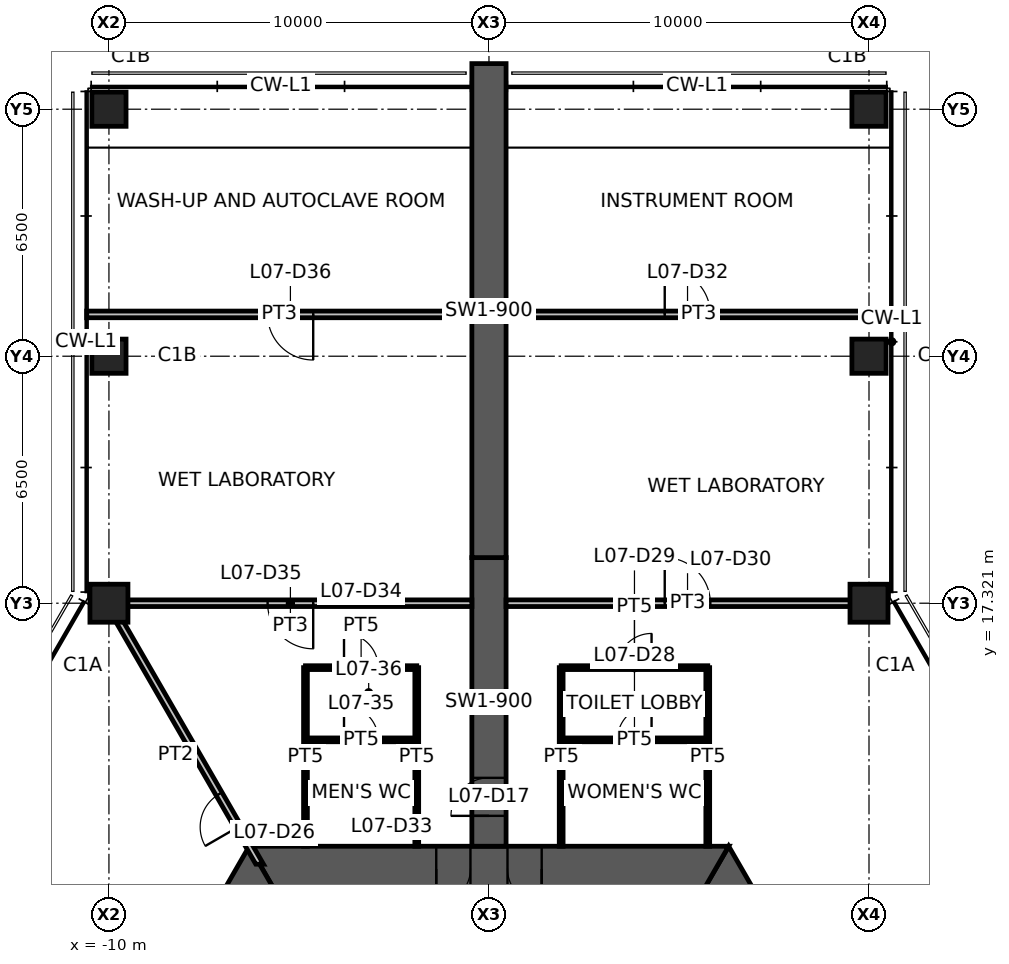
"""IFC4 building model, lengths in metres.
Left out: names, types, materials, properties, quantities, classifications, styles, units other than length and angle.
Written with IfcOpenShell. Run it as: python <this file> out.ifc"""

import sys

from ifc_helpers import new_model, si_unit, direction, frame, frame_2d, origin, origin_2d, place, context, subcontext, project, spatial, polyline, rectangle, hollow_rectangle, outline, extrude, element, fill, save


model = new_model("IFC4")
c1 = context("Model", 3, precision=1e-05, world=origin(), true_north=direction((0.0, 1.0)))
c2 = subcontext(c1, "Body", "Model", "MODEL_VIEW")
j1 = project(units=[si_unit("LENGTHUNIT", "METRE"), si_unit("PLANEANGLEUNIT", "RADIAN")], contexts=[c1])
p1 = place(None, origin())
s1 = spatial("IfcSite", under=j1, at=p1, CompositionType="ELEMENT")
p2 = place(p1, origin())
s2 = spatial("IfcBuilding", under=s1, at=p2, CompositionType="ELEMENT")
p3 = place(p2, frame((0.0, 0.0, 26.8)))
s3 = spatial("IfcBuildingStorey", under=s2, at=p3, CompositionType="ELEMENT", Elevation=26.8)
for number, where, z_axis, x_axis in (
    (1, (10.0, 17.321, 0.0), (0.0, 0.0, 1.0), (1.0, 0.0, 0.0)),
    (2, (-10.0, 17.321, 0.0), (0.0, 0.0, 1.0), (1.0, 0.0, 0.0)),
):
    element("IfcColumn", number, at=place(p3, frame(where, z_axis=z_axis, x_axis=x_axis)), inside=s3, PredefinedType="COLUMN", context=c2, shape_type="SweptSolid", body=[
        extrude(hollow_rectangle(XDim=1.0, YDim=1.0, WallThickness=0.06, at=origin_2d()), origin(), (0.0, 0.0, 1.0), 4.2),
    ])
for number, where, z_axis, x_axis in (
    (3, (10.0, 23.821, 0.0), (0.0, 0.0, 1.0), (1.0, 0.0, 0.0)),
    (4, (10.0, 30.321, 0.0), (0.0, 0.0, 1.0), (1.0, 0.0, 0.0)),
    (5, (-10.0, 23.821, 0.0), (0.0, 0.0, 1.0), (1.0, 0.0, 0.0)),
    (6, (-10.0, 30.321, 0.0), (0.0, 0.0, 1.0), (1.0, 0.0, 0.0)),
):
    element("IfcColumn", number, at=place(p3, frame(where, z_axis=z_axis, x_axis=x_axis)), inside=s3, PredefinedType="COLUMN", context=c2, shape_type="SweptSolid", body=[
        extrude(hollow_rectangle(XDim=0.9, YDim=0.9, WallThickness=0.05, at=origin_2d()), origin(), (0.0, 0.0, 1.0), 4.2),
    ])
p4 = place(p3, frame((11.922, 0.0, 0.0), z_axis=(0.0, 0.0, 1.0), x_axis=(-0.500004296715, 0.866022923061, 0.0)))
e7 = element("IfcWall", 7, at=p4, inside=s3, PredefinedType="SHEAR", context=c2, shape_type="SweptSolid", body=[
    extrude(outline(polyline([(-0.346, -0.6), (5.835, -0.6), (6.635, -0.6), (12.269, -0.6), (11.576, 0.6), (6.635, 0.6), (5.835, 0.6), (0.346, 0.6), (-0.346, -0.6)])), origin(), (0.0, 0.0, 1.0), 4.2),
])
p5 = place(p4, frame((5.835, 0.0, 0.0)))
e8 = element("IfcOpeningElement", 8, at=p5, cuts=e7, PredefinedType="OPENING", context=c2, shape_type="SweptSolid", body=[
    extrude(rectangle(XDim=0.8, YDim=2.1, at=frame_2d((0.4, 1.05))), frame((0.0, 0.61, 0.0), z_axis=(0.0, -1.0, 0.0), x_axis=(1.0, 0.0, 0.0)), (0.0, 0.0, 1.0), 1.22),
])
p6 = place(p3, frame((5.961, 10.325, 0.0), z_axis=(0.0, 0.0, 1.0), x_axis=(-1.0, 0.0, 0.0)))
e9 = element("IfcWall", 9, at=p6, inside=s3, PredefinedType="SHEAR", context=c2, shape_type="SweptSolid", body=[
    extrude(outline(polyline([(-0.346, -0.6), (4.574, -0.6), (5.474, -0.6), (6.449, -0.6), (7.349, -0.6), (12.269, -0.6), (11.576, 0.6), (7.349, 0.6), (6.449, 0.6), (5.474, 0.6), (4.574, 0.6), (0.346, 0.6), (-0.346, -0.6)])), origin(), (0.0, 0.0, 1.0), 4.2),
])
p7 = place(p6, frame((6.449, 0.0, 0.0)))
e10 = element("IfcOpeningElement", 10, at=p7, cuts=e9, PredefinedType="OPENING", context=c2, shape_type="SweptSolid", body=[
    extrude(rectangle(XDim=0.9, YDim=2.1, at=frame_2d((0.45, 1.05))), frame((0.0, 0.61, 0.0), z_axis=(0.0, -1.0, 0.0), x_axis=(1.0, 0.0, 0.0)), (0.0, 0.0, 1.0), 1.22),
])
p8 = place(p6, frame((4.574, 0.0, 0.0)))
e11 = element("IfcOpeningElement", 11, at=p8, cuts=e9, PredefinedType="OPENING", context=c2, shape_type="SweptSolid", body=[
    extrude(rectangle(XDim=0.9, YDim=2.1, at=frame_2d((0.45, 1.05))), frame((0.0, 0.61, 0.0), z_axis=(0.0, -1.0, 0.0), x_axis=(1.0, 0.0, 0.0)), (0.0, 0.0, 1.0), 1.22),
])
p9 = place(p3, frame((-5.961, 10.325, 0.0), z_axis=(0.0, 0.0, 1.0), x_axis=(-0.500004296715, -0.866022923061, 0.0)))
e12 = element("IfcWall", 12, at=p9, inside=s3, PredefinedType="SHEAR", context=c2, shape_type="SweptSolid", body=[
    extrude(outline(polyline([(-0.346, -0.6), (4.494, -0.6), (5.494, -0.6), (12.269, -0.6), (11.576, 0.6), (5.494, 0.6), (4.494, 0.6), (0.346, 0.6), (-0.346, -0.6)])), origin(), (0.0, 0.0, 1.0), 4.2),
])
p10 = place(p9, frame((4.494, 0.0, 0.0)))
e13 = element("IfcOpeningElement", 13, at=p10, cuts=e12, PredefinedType="OPENING", context=c2, shape_type="SweptSolid", body=[
    extrude(rectangle(XDim=1.0, YDim=2.1, at=frame_2d((0.5, 1.05))), frame((0.0, 0.61, 0.0), z_axis=(0.0, -1.0, 0.0), x_axis=(1.0, 0.0, 0.0)), (0.0, 0.0, 1.0), 1.22),
])
p11 = place(p3, frame((0.0, 10.925, 0.0), z_axis=(0.0, 0.0, 1.0), x_axis=(0.0, 1.0, 0.0)))
e14 = element("IfcWall", 14, at=p11, inside=s3, PredefinedType="SHEAR", context=c2, shape_type="SweptSolid", body=[
    extrude(rectangle(XDim=7.595, YDim=0.9, at=frame_2d((3.798, 0.0))), origin(), (0.0, 0.0, 1.0), 4.2),
])
p12 = place(p11, frame((0.8, 0.0, 0.0)))
e15 = element("IfcOpeningElement", 15, at=p12, cuts=e14, PredefinedType="OPENING", context=c2, shape_type="SweptSolid", body=[
    extrude(rectangle(XDim=1.0, YDim=2.1, at=frame_2d((0.5, 1.05))), frame((0.0, 0.46, 0.0), z_axis=(0.0, -1.0, 0.0), x_axis=(1.0, 0.0, 0.0)), (0.0, 0.0, 1.0), 0.92),
])
p13 = place(p3, frame((0.0, 18.521, 0.0), z_axis=(0.0, 0.0, 1.0), x_axis=(0.0, 1.0, 0.0)))
e16 = element("IfcWall", 16, at=p13, inside=s3, PredefinedType="SHEAR", context=c2, shape_type="SweptSolid", body=[
    extrude(rectangle(XDim=13.0, YDim=0.9, at=frame_2d((6.5, 0.0))), origin(), (0.0, 0.0, 1.0), 4.2),
])
p14 = place(p3, frame((-6.035, 10.453, 0.0), z_axis=(0.0, 0.0, 1.0), x_axis=(-0.499993402427, 0.866029212861, 0.0)))
e17 = element("IfcWall", 17, at=p14, inside=s3, PredefinedType="PARTITIONING", context=c2, shape_type="SweptSolid", body=[
    extrude(outline(polyline([(-0.051, -0.087), (1.129, -0.087), (2.129, -0.087), (7.93, -0.087), (7.93, 0.087), (2.129, 0.087), (1.129, 0.087), (0.051, 0.087), (-0.051, -0.087)])), origin(), (0.0, 0.0, 1.0), 3.33),
])
p15 = place(p14, frame((1.129, 0.0, 0.0)))
e18 = element("IfcOpeningElement", 18, at=p15, cuts=e17, PredefinedType="OPENING", context=c2, shape_type="SweptSolid", body=[
    extrude(rectangle(XDim=1.0, YDim=2.1, at=frame_2d((0.5, 1.05))), frame((0.0, 0.098, 0.0), z_axis=(0.0, -1.0, 0.0), x_axis=(1.0, 0.0, 0.0)), (0.0, 0.0, 1.0), 0.195),
])
p16 = place(p3, frame((1.9, 13.725, 0.0), z_axis=(0.0, 0.0, 1.0), x_axis=(1.0, 0.0, 0.0)))
e19 = element("IfcWall", 19, at=p16, inside=s3, PredefinedType="PARTITIONING", context=c2, shape_type="SweptSolid", body=[
    extrude(rectangle(XDim=3.857, YDim=0.1, at=frame_2d((1.929, 0.0))), origin(), (0.0, 0.0, 1.0), 3.23),
])
p17 = place(p16, frame((1.479, 0.0, 0.0)))
e20 = element("IfcOpeningElement", 20, at=p17, cuts=e19, PredefinedType="OPENING", context=c2, shape_type="SweptSolid", body=[
    extrude(rectangle(XDim=0.9, YDim=2.1, at=frame_2d((0.45, 1.05))), frame((0.0, 0.06, 0.0), z_axis=(0.0, -1.0, 0.0), x_axis=(1.0, 0.0, 0.0)), (0.0, 0.0, 1.0), 0.12),
])
p18 = place(p3, frame((1.9, 15.625, 0.0), z_axis=(0.0, 0.0, 1.0), x_axis=(1.0, 0.0, 0.0)))
e21 = element("IfcWall", 21, at=p18, inside=s3, PredefinedType="PARTITIONING", context=c2, shape_type="SweptSolid", body=[
    extrude(rectangle(XDim=3.857, YDim=0.1, at=frame_2d((1.929, 0.0))), origin(), (0.0, 0.0, 1.0), 3.23),
])
p19 = place(p18, frame((1.479, 0.0, 0.0)))
e22 = element("IfcOpeningElement", 22, at=p19, cuts=e21, PredefinedType="OPENING", context=c2, shape_type="SweptSolid", body=[
    extrude(rectangle(XDim=0.9, YDim=2.1, at=frame_2d((0.45, 1.05))), frame((0.0, 0.06, 0.0), z_axis=(0.0, -1.0, 0.0), x_axis=(1.0, 0.0, 0.0)), (0.0, 0.0, 1.0), 0.12),
])
for number, where, z_axis, x_axis in (
    (23, (1.9, 10.925, 0.0), (0.0, 0.0, 1.0), (0.0, 1.0, 0.0)),
    (24, (5.757, 10.925, 0.0), (0.0, 0.0, 1.0), (0.0, 1.0, 0.0)),
):
    element("IfcWall", number, at=place(p3, frame(where, z_axis=z_axis, x_axis=x_axis)), inside=s3, PredefinedType="PARTITIONING", context=c2, shape_type="SweptSolid", body=[
        extrude(rectangle(XDim=4.7, YDim=0.1, at=frame_2d((2.35, 0.0))), origin(), (0.0, 0.0, 1.0), 3.23),
    ])
p20 = place(p3, frame((0.45, 17.321, 0.0), z_axis=(0.0, 0.0, 1.0), x_axis=(1.0, 0.0, 0.0)))
e25 = element("IfcWall", 25, at=p20, inside=s3, PredefinedType="PARTITIONING", context=c2, shape_type="SweptSolid", body=[
    extrude(rectangle(XDim=9.55, YDim=0.175, at=frame_2d((4.775, 0.0))), origin(), (0.0, 0.0, 1.0), 3.238),
])
p21 = place(p20, frame((4.175, 0.0, 0.0)))
e26 = element("IfcOpeningElement", 26, at=p21, cuts=e25, PredefinedType="OPENING", context=c2, shape_type="SweptSolid", body=[
    extrude(rectangle(XDim=1.2, YDim=2.1, at=frame_2d((0.6, 1.05))), frame((0.0, 0.098, 0.0), z_axis=(0.0, -1.0, 0.0), x_axis=(1.0, 0.0, 0.0)), (0.0, 0.0, 1.0), 0.195),
])
p22 = place(p3, frame((0.45, 24.92, 0.0), z_axis=(0.0, 0.0, 1.0), x_axis=(1.0, 0.0, 0.0)))
e27 = element("IfcWall", 27, at=p22, inside=s3, PredefinedType="PARTITIONING", context=c2, shape_type="SweptSolid", body=[
    extrude(rectangle(XDim=10.135, YDim=0.175, at=frame_2d((5.067, 0.0))), origin(), (0.0, 0.0, 1.0), 4.03),
])
p23 = place(p22, frame((4.175, 0.0, 0.0)))
e28 = element("IfcOpeningElement", 28, at=p23, cuts=e27, PredefinedType="OPENING", context=c2, shape_type="SweptSolid", body=[
    extrude(rectangle(XDim=1.2, YDim=2.1, at=frame_2d((0.6, 1.05))), frame((0.0, 0.098, 0.0), z_axis=(0.0, -1.0, 0.0), x_axis=(1.0, 0.0, 0.0)), (0.0, 0.0, 1.0), 0.195),
])
p24 = place(p3, frame((-4.829, 13.725, 0.0), z_axis=(0.0, 0.0, 1.0), x_axis=(1.0, 0.0, 0.0)))
e29 = element("IfcWall", 29, at=p24, inside=s3, PredefinedType="PARTITIONING", context=c2, shape_type="SweptSolid", body=[
    extrude(rectangle(XDim=2.929, YDim=0.1, at=frame_2d((1.464, 0.0))), origin(), (0.0, 0.0, 1.0), 3.23),
])
p25 = place(p24, frame((1.014, 0.0, 0.0)))
e30 = element("IfcOpeningElement", 30, at=p25, cuts=e29, PredefinedType="OPENING", context=c2, shape_type="SweptSolid", body=[
    extrude(rectangle(XDim=0.9, YDim=2.1, at=frame_2d((0.45, 1.05))), frame((0.0, 0.06, 0.0), z_axis=(0.0, -1.0, 0.0), x_axis=(1.0, 0.0, 0.0)), (0.0, 0.0, 1.0), 0.12),
])
p26 = place(p3, frame((-4.829, 15.625, 0.0), z_axis=(0.0, 0.0, 1.0), x_axis=(1.0, 0.0, 0.0)))
e31 = element("IfcWall", 31, at=p26, inside=s3, PredefinedType="PARTITIONING", context=c2, shape_type="SweptSolid", body=[
    extrude(rectangle(XDim=2.929, YDim=0.1, at=frame_2d((1.464, 0.0))), origin(), (0.0, 0.0, 1.0), 3.23),
])
p27 = place(p26, frame((1.014, 0.0, 0.0)))
e32 = element("IfcOpeningElement", 32, at=p27, cuts=e31, PredefinedType="OPENING", context=c2, shape_type="SweptSolid", body=[
    extrude(rectangle(XDim=0.9, YDim=2.1, at=frame_2d((0.45, 1.05))), frame((0.0, 0.06, 0.0), z_axis=(0.0, -1.0, 0.0), x_axis=(1.0, 0.0, 0.0)), (0.0, 0.0, 1.0), 0.12),
])
for number, where, z_axis, x_axis in (
    (33, (-1.9, 10.925, 0.0), (0.0, 0.0, 1.0), (0.0, 1.0, 0.0)),
    (34, (-4.829, 10.925, 0.0), (0.0, 0.0, 1.0), (0.0, 1.0, 0.0)),
):
    element("IfcWall", number, at=place(p3, frame(where, z_axis=z_axis, x_axis=x_axis)), inside=s3, PredefinedType="PARTITIONING", context=c2, shape_type="SweptSolid", body=[
        extrude(rectangle(XDim=4.7, YDim=0.1, at=frame_2d((2.35, 0.0))), origin(), (0.0, 0.0, 1.0), 3.23),
    ])
p28 = place(p3, frame((-0.45, 17.321, 0.0), z_axis=(0.0, 0.0, 1.0), x_axis=(-1.0, 0.0, 0.0)))
e35 = element("IfcWall", 35, at=p28, inside=s3, PredefinedType="PARTITIONING", context=c2, shape_type="SweptSolid", body=[
    extrude(rectangle(XDim=9.55, YDim=0.175, at=frame_2d((4.775, 0.0))), origin(), (0.0, 0.0, 1.0), 3.238),
])
p29 = place(p28, frame((4.175, 0.0, 0.0)))
e36 = element("IfcOpeningElement", 36, at=p29, cuts=e35, PredefinedType="OPENING", context=c2, shape_type="SweptSolid", body=[
    extrude(rectangle(XDim=1.2, YDim=2.1, at=frame_2d((0.6, 1.05))), frame((0.0, 0.098, 0.0), z_axis=(0.0, -1.0, 0.0), x_axis=(1.0, 0.0, 0.0)), (0.0, 0.0, 1.0), 0.195),
])
p30 = place(p3, frame((-0.45, 24.92, 0.0), z_axis=(0.0, 0.0, 1.0), x_axis=(-1.0, 0.0, 0.0)))
e37 = element("IfcWall", 37, at=p30, inside=s3, PredefinedType="PARTITIONING", context=c2, shape_type="SweptSolid", body=[
    extrude(rectangle(XDim=10.135, YDim=0.175, at=frame_2d((5.067, 0.0))), origin(), (0.0, 0.0, 1.0), 4.03),
])
p31 = place(p30, frame((4.175, 0.0, 0.0)))
e38 = element("IfcOpeningElement", 38, at=p31, cuts=e37, PredefinedType="OPENING", context=c2, shape_type="SweptSolid", body=[
    extrude(rectangle(XDim=1.2, YDim=2.1, at=frame_2d((0.6, 1.05))), frame((0.0, 0.098, 0.0), z_axis=(0.0, -1.0, 0.0), x_axis=(1.0, 0.0, 0.0)), (0.0, 0.0, 1.0), 0.195),
])
p32 = place(p7, origin())
e39 = element("IfcDoor", 39, at=p32, inside=s3, OperationType="SINGLE_SWING_RIGHT", PredefinedType="DOOR", context=c2, shape_type="SweptSolid", body=[
    extrude(rectangle(XDim=0.9, YDim=2.1, at=frame_2d((0.45, 1.05))), frame((0.0, 0.025, 0.0), z_axis=(0.0, -1.0, 0.0), x_axis=(1.0, 0.0, 0.0)), (0.0, 0.0, 1.0), 0.05),
])
fill(e10, e39)
p33 = place(p8, origin())
e40 = element("IfcDoor", 40, at=p33, inside=s3, OperationType="SINGLE_SWING_LEFT", PredefinedType="DOOR", context=c2, shape_type="SweptSolid", body=[
    extrude(rectangle(XDim=0.9, YDim=2.1, at=frame_2d((0.45, 1.05))), frame((0.0, 0.025, 0.0), z_axis=(0.0, -1.0, 0.0), x_axis=(1.0, 0.0, 0.0)), (0.0, 0.0, 1.0), 0.05),
])
fill(e11, e40)
p34 = place(p12, origin())
e41 = element("IfcDoor", 41, at=p34, inside=s3, OperationType="SINGLE_SWING_LEFT", PredefinedType="DOOR", context=c2, shape_type="SweptSolid", body=[
    extrude(rectangle(XDim=1.0, YDim=2.1, at=frame_2d((0.5, 1.05))), frame((0.0, 0.025, 0.0), z_axis=(0.0, -1.0, 0.0), x_axis=(1.0, 0.0, 0.0)), (0.0, 0.0, 1.0), 0.05),
])
fill(e15, e41)
p35 = place(p15, origin())
e42 = element("IfcDoor", 42, at=p35, inside=s3, OperationType="SINGLE_SWING_LEFT", PredefinedType="DOOR", context=c2, shape_type="SweptSolid", body=[
    extrude(rectangle(XDim=1.0, YDim=2.1, at=frame_2d((0.5, 1.05))), frame((0.0, 0.025, 0.0), z_axis=(0.0, -1.0, 0.0), x_axis=(1.0, 0.0, 0.0)), (0.0, 0.0, 1.0), 0.05),
])
fill(e18, e42)
p36 = place(p17, origin())
e43 = element("IfcDoor", 43, at=p36, inside=s3, OperationType="SINGLE_SWING_RIGHT", PredefinedType="DOOR", context=c2, shape_type="SweptSolid", body=[
    extrude(rectangle(XDim=0.9, YDim=2.1, at=frame_2d((0.45, 1.05))), frame((0.0, 0.025, 0.0), z_axis=(0.0, -1.0, 0.0), x_axis=(1.0, 0.0, 0.0)), (0.0, 0.0, 1.0), 0.05),
])
fill(e20, e43)
p37 = place(p19, origin())
e44 = element("IfcDoor", 44, at=p37, inside=s3, OperationType="SINGLE_SWING_RIGHT", PredefinedType="DOOR", context=c2, shape_type="SweptSolid", body=[
    extrude(rectangle(XDim=0.9, YDim=2.1, at=frame_2d((0.45, 1.05))), frame((0.0, 0.025, 0.0), z_axis=(0.0, -1.0, 0.0), x_axis=(1.0, 0.0, 0.0)), (0.0, 0.0, 1.0), 0.05),
])
fill(e22, e44)
p38 = place(p21, origin())
e45 = element("IfcDoor", 45, at=p38, inside=s3, OperationType="DOUBLE_DOOR_SINGLE_SWING", PredefinedType="DOOR", context=c2, shape_type="SweptSolid", body=[
    extrude(rectangle(XDim=1.2, YDim=2.1, at=frame_2d((0.6, 1.05))), frame((0.0, 0.025, 0.0), z_axis=(0.0, -1.0, 0.0), x_axis=(1.0, 0.0, 0.0)), (0.0, 0.0, 1.0), 0.05),
])
fill(e26, e45)
p39 = place(p23, origin())
e46 = element("IfcDoor", 46, at=p39, inside=s3, OperationType="DOUBLE_DOOR_SINGLE_SWING", PredefinedType="DOOR", context=c2, shape_type="SweptSolid", body=[
    extrude(rectangle(XDim=1.2, YDim=2.1, at=frame_2d((0.6, 1.05))), frame((0.0, 0.025, 0.0), z_axis=(0.0, -1.0, 0.0), x_axis=(1.0, 0.0, 0.0)), (0.0, 0.0, 1.0), 0.05),
])
fill(e28, e46)
p40 = place(p25, origin())
e47 = element("IfcDoor", 47, at=p40, inside=s3, OperationType="SINGLE_SWING_LEFT", PredefinedType="DOOR", context=c2, shape_type="SweptSolid", body=[
    extrude(rectangle(XDim=0.9, YDim=2.1, at=frame_2d((0.45, 1.05))), frame((0.0, 0.025, 0.0), z_axis=(0.0, -1.0, 0.0), x_axis=(1.0, 0.0, 0.0)), (0.0, 0.0, 1.0), 0.05),
])
fill(e30, e47)
p41 = place(p27, origin())
e48 = element("IfcDoor", 48, at=p41, inside=s3, OperationType="SINGLE_SWING_LEFT", PredefinedType="DOOR", context=c2, shape_type="SweptSolid", body=[
    extrude(rectangle(XDim=0.9, YDim=2.1, at=frame_2d((0.45, 1.05))), frame((0.0, 0.025, 0.0), z_axis=(0.0, -1.0, 0.0), x_axis=(1.0, 0.0, 0.0)), (0.0, 0.0, 1.0), 0.05),
])
fill(e32, e48)
p42 = place(p29, origin())
e49 = element("IfcDoor", 49, at=p42, inside=s3, OperationType="DOUBLE_DOOR_SINGLE_SWING", PredefinedType="DOOR", context=c2, shape_type="SweptSolid", body=[
    extrude(rectangle(XDim=1.2, YDim=2.1, at=frame_2d((0.6, 1.05))), frame((0.0, 0.025, 0.0), z_axis=(0.0, -1.0, 0.0), x_axis=(1.0, 0.0, 0.0)), (0.0, 0.0, 1.0), 0.05),
])
fill(e36, e49)
p43 = place(p31, origin())
e50 = element("IfcDoor", 50, at=p43, inside=s3, OperationType="DOUBLE_DOOR_SINGLE_SWING", PredefinedType="DOOR", context=c2, shape_type="SweptSolid", body=[
    extrude(rectangle(XDim=1.2, YDim=2.1, at=frame_2d((0.6, 1.05))), frame((0.0, 0.025, 0.0), z_axis=(0.0, -1.0, 0.0), x_axis=(1.0, 0.0, 0.0)), (0.0, 0.0, 1.0), 0.05),
])
fill(e38, e50)
save(model, sys.argv[1])
